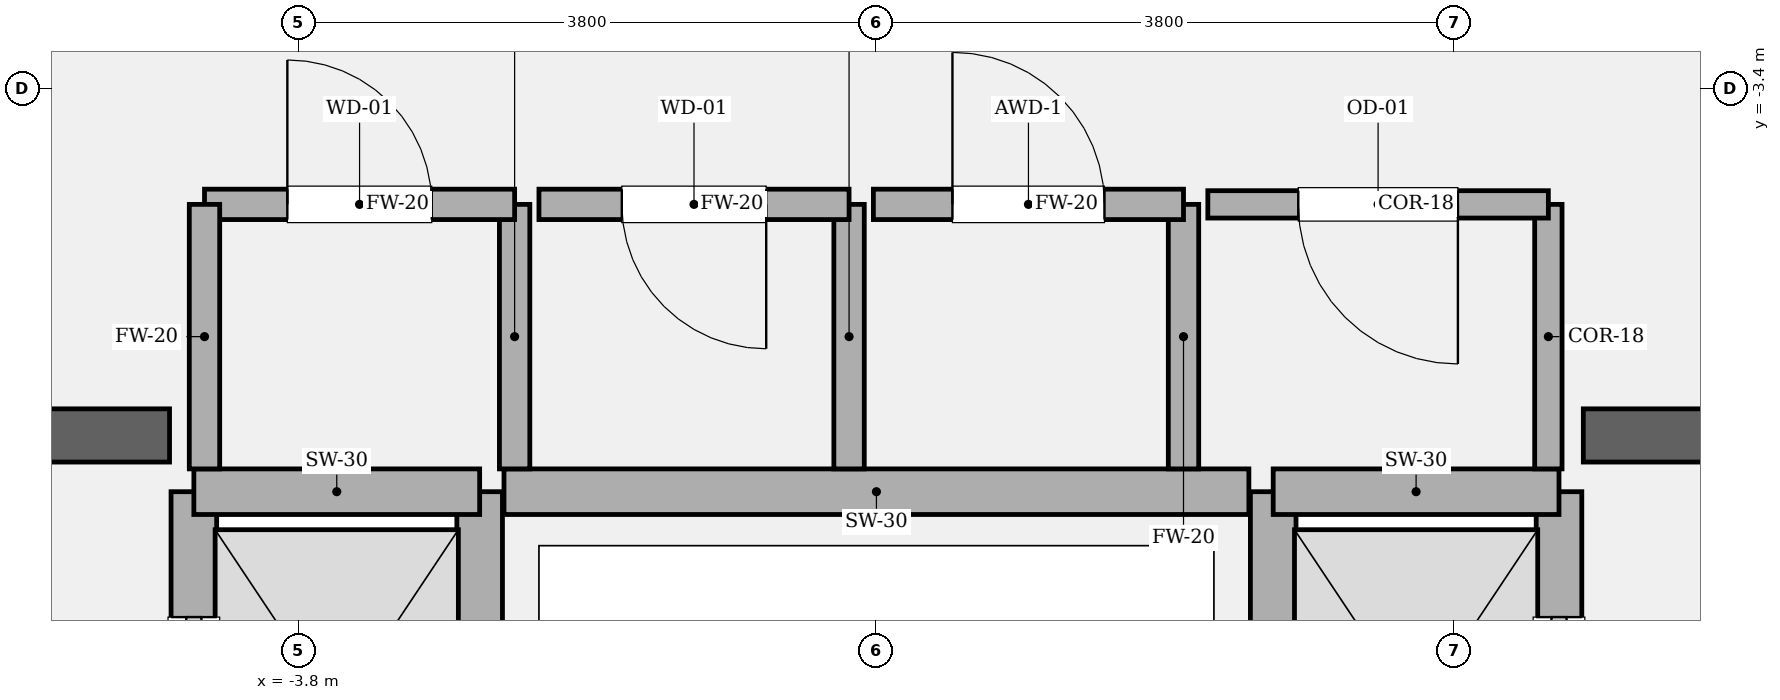
"""IFC4 building model, lengths in metres.
Left out: names, types, materials, properties, quantities, classifications, styles, units other than length and angle.
Written with IfcOpenShell. Run it as: python <this file> out.ifc"""

import sys

from ifc_helpers import new_model, si_unit, direction, frame, frame_2d, origin, place, context, subcontext, project, spatial, rectangle, extrude, element, fill, save


model = new_model("IFC4")
c1 = context("Model", 3, precision=1e-05, world=origin(), true_north=direction((0.0, 1.0)))
c2 = subcontext(c1, "Body", "Model", "MODEL_VIEW")
j1 = project(units=[si_unit("LENGTHUNIT", "METRE"), si_unit("PLANEANGLEUNIT", "RADIAN")], contexts=[c1])
p1 = place(None, origin())
s1 = spatial("IfcSite", under=j1, at=p1, CompositionType="ELEMENT")
p2 = place(p1, origin())
s2 = spatial("IfcBuilding", under=s1, at=p2, CompositionType="ELEMENT")
p3 = place(p2, frame((0.0, 0.0, 44.4)))
s3 = spatial("IfcBuildingStorey", under=s2, at=p3, CompositionType="ELEMENT", Elevation=44.4)
p4 = place(p3, frame((-9.825, -5.68, 0.0), z_axis=(0.0, 0.0, 1.0), x_axis=(1.0, 0.0, 0.0)))
e1 = element("IfcWall", 1, at=p4, inside=s3, PredefinedType="SOLIDWALL", context=c2, shape_type="SweptSolid", body=[
    extrude(rectangle(XDim=5.175, YDim=0.35, at=frame_2d((2.587, 0.0))), origin(), (0.0, 0.0, 1.0), 4.05),
])
p5 = place(p4, frame((1.285, 0.0, 0.0)))
e2 = element("IfcOpeningElement", 2, at=p5, cuts=e1, PredefinedType="OPENING", context=c2, shape_type="SweptSolid", body=[
    extrude(rectangle(XDim=1.18, YDim=2.2, at=frame_2d((0.59, 1.1))), frame((0.0, 0.185, 0.0), z_axis=(0.0, -1.0, 0.0), x_axis=(1.0, 0.0, 0.0)), (0.0, 0.0, 1.0), 0.37),
])
p6 = place(p3, frame((4.65, -5.68, 0.0), z_axis=(0.0, 0.0, 1.0), x_axis=(1.0, 0.0, 0.0)))
e3 = element("IfcWall", 3, at=p6, inside=s3, PredefinedType="SOLIDWALL", context=c2, shape_type="SweptSolid", body=[
    extrude(rectangle(XDim=5.175, YDim=0.35, at=frame_2d((2.587, 0.0))), origin(), (0.0, 0.0, 1.0), 4.05),
])
p7 = place(p6, frame((2.71, 0.0, 0.0)))
e4 = element("IfcOpeningElement", 4, at=p7, cuts=e3, PredefinedType="OPENING", context=c2, shape_type="SweptSolid", body=[
    extrude(rectangle(XDim=1.18, YDim=2.2, at=frame_2d((0.59, 1.1))), frame((0.0, 0.185, 0.0), z_axis=(0.0, -1.0, 0.0), x_axis=(1.0, 0.0, 0.0)), (0.0, 0.0, 1.0), 0.37),
])
p8 = place(p3, frame((-4.49, -8.82, 0.0), z_axis=(0.0, 0.0, 1.0), x_axis=(0.0, 1.0, 0.0)))
e5 = element("IfcWall", 5, at=p8, inside=s3, PredefinedType="SOLIDWALL", context=c2, shape_type="SweptSolid", body=[
    extrude(rectangle(XDim=2.77, YDim=0.3, at=frame_2d((1.385, 0.0))), origin(), (0.0, 0.0, 1.0), 3.81),
])
p9 = place(p8, frame((0.825, 0.0, 0.0)))
e6 = element("IfcOpeningElement", 6, at=p9, cuts=e5, PredefinedType="OPENING", context=c2, shape_type="SweptSolid", body=[
    extrude(rectangle(XDim=1.12, YDim=2.25, at=frame_2d((0.56, 1.125))), frame((0.0, 0.16, 0.0), z_axis=(0.0, -1.0, 0.0), x_axis=(1.0, 0.0, 0.0)), (0.0, 0.0, 1.0), 0.32),
])
p10 = place(p3, frame((-2.61, -8.82, 0.0), z_axis=(0.0, 0.0, 1.0), x_axis=(0.0, 1.0, 0.0)))
e7 = element("IfcWall", 7, at=p10, inside=s3, PredefinedType="SOLIDWALL", context=c2, shape_type="SweptSolid", body=[
    extrude(rectangle(XDim=2.77, YDim=0.3, at=frame_2d((1.385, 0.0))), origin(), (0.0, 0.0, 1.0), 3.81),
])
p11 = place(p3, frame((-4.49, -6.05, 0.0), z_axis=(0.0, 0.0, 1.0), x_axis=(1.0, 0.0, 0.0)))
e8 = element("IfcWall", 8, at=p11, inside=s3, PredefinedType="SOLIDWALL", context=c2, shape_type="SweptSolid", body=[
    extrude(rectangle(XDim=1.88, YDim=0.3, at=frame_2d((0.94, 0.0))), origin(), (0.0, 0.0, 1.0), 3.81),
])
p12 = place(p3, frame((4.49, -8.82, 0.0), z_axis=(0.0, 0.0, 1.0), x_axis=(0.0, 1.0, 0.0)))
e9 = element("IfcWall", 9, at=p12, inside=s3, PredefinedType="SOLIDWALL", context=c2, shape_type="SweptSolid", body=[
    extrude(rectangle(XDim=2.77, YDim=0.3, at=frame_2d((1.385, 0.0))), origin(), (0.0, 0.0, 1.0), 3.81),
])
p13 = place(p12, frame((0.825, 0.0, 0.0)))
e10 = element("IfcOpeningElement", 10, at=p13, cuts=e9, PredefinedType="OPENING", context=c2, shape_type="SweptSolid", body=[
    extrude(rectangle(XDim=1.12, YDim=2.25, at=frame_2d((0.56, 1.125))), frame((0.0, 0.16, 0.0), z_axis=(0.0, -1.0, 0.0), x_axis=(1.0, 0.0, 0.0)), (0.0, 0.0, 1.0), 0.32),
])
p14 = place(p3, frame((2.61, -8.82, 0.0), z_axis=(0.0, 0.0, 1.0), x_axis=(0.0, 1.0, 0.0)))
e11 = element("IfcWall", 11, at=p14, inside=s3, PredefinedType="SOLIDWALL", context=c2, shape_type="SweptSolid", body=[
    extrude(rectangle(XDim=2.77, YDim=0.3, at=frame_2d((1.385, 0.0))), origin(), (0.0, 0.0, 1.0), 3.81),
])
p15 = place(p3, frame((2.61, -6.05, 0.0), z_axis=(0.0, 0.0, 1.0), x_axis=(1.0, 0.0, 0.0)))
e12 = element("IfcWall", 12, at=p15, inside=s3, PredefinedType="SOLIDWALL", context=c2, shape_type="SweptSolid", body=[
    extrude(rectangle(XDim=1.88, YDim=0.3, at=frame_2d((0.94, 0.0))), origin(), (0.0, 0.0, 1.0), 3.81),
])
p16 = place(p3, frame((-2.45, -6.05, 0.0), z_axis=(0.0, 0.0, 1.0), x_axis=(1.0, 0.0, 0.0)))
e13 = element("IfcWall", 13, at=p16, inside=s3, PredefinedType="SOLIDWALL", context=c2, shape_type="SweptSolid", body=[
    extrude(rectangle(XDim=4.9, YDim=0.3, at=frame_2d((2.45, 0.0))), origin(), (0.0, 0.0, 1.0), 3.81),
])
p17 = place(p3, frame((-2.38, -5.9, 0.0), z_axis=(0.0, 0.0, 1.0), x_axis=(0.0, 1.0, 0.0)))
e14 = element("IfcWall", 14, at=p17, inside=s3, PredefinedType="SOLIDWALL", context=c2, shape_type="SweptSolid", body=[
    extrude(rectangle(XDim=1.74, YDim=0.2, at=frame_2d((0.87, 0.0))), origin(), (0.0, 0.0, 1.0), 3.81),
])
p18 = place(p3, frame((-2.38, -4.16, 0.0), z_axis=(0.0, 0.0, 1.0), x_axis=(-1.0, 0.0, 0.0)))
e15 = element("IfcWall", 15, at=p18, inside=s3, PredefinedType="SOLIDWALL", context=c2, shape_type="SweptSolid", body=[
    extrude(rectangle(XDim=2.04, YDim=0.2, at=frame_2d((1.02, 0.0))), origin(), (0.0, 0.0, 1.0), 3.81),
])
p19 = place(p18, frame((0.545, 0.0, 0.0)))
e16 = element("IfcOpeningElement", 16, at=p19, cuts=e15, PredefinedType="OPENING", context=c2, shape_type="SweptSolid", body=[
    extrude(rectangle(XDim=0.95, YDim=2.15, at=frame_2d((0.475, 1.075))), frame((0.0, 0.11, 0.0), z_axis=(0.0, -1.0, 0.0), x_axis=(1.0, 0.0, 0.0)), (0.0, 0.0, 1.0), 0.22),
])
for number, where, z_axis, x_axis in (
    (17, (-4.42, -4.16, 0.0), (0.0, 0.0, 1.0), (0.0, -1.0, 0.0)),
    (18, (-0.18, -5.9, 0.0), (0.0, 0.0, 1.0), (0.0, 1.0, 0.0)),
):
    element("IfcWall", number, at=place(p3, frame(where, z_axis=z_axis, x_axis=x_axis)), inside=s3, PredefinedType="SOLIDWALL", context=c2, shape_type="SweptSolid", body=[
        extrude(rectangle(XDim=1.74, YDim=0.2, at=frame_2d((0.87, 0.0))), origin(), (0.0, 0.0, 1.0), 3.81),
    ])
p20 = place(p3, frame((-0.18, -4.16, 0.0), z_axis=(0.0, 0.0, 1.0), x_axis=(-1.0, 0.0, 0.0)))
e19 = element("IfcWall", 19, at=p20, inside=s3, PredefinedType="SOLIDWALL", context=c2, shape_type="SweptSolid", body=[
    extrude(rectangle(XDim=2.04, YDim=0.2, at=frame_2d((1.02, 0.0))), origin(), (0.0, 0.0, 1.0), 3.81),
])
p21 = place(p20, frame((0.545, 0.0, 0.0)))
e20 = element("IfcOpeningElement", 20, at=p21, cuts=e19, PredefinedType="OPENING", context=c2, shape_type="SweptSolid", body=[
    extrude(rectangle(XDim=0.95, YDim=2.15, at=frame_2d((0.475, 1.075))), frame((0.0, 0.11, 0.0), z_axis=(0.0, -1.0, 0.0), x_axis=(1.0, 0.0, 0.0)), (0.0, 0.0, 1.0), 0.22),
])
p22 = place(p3, frame((2.02, -5.9, 0.0), z_axis=(0.0, 0.0, 1.0), x_axis=(0.0, 1.0, 0.0)))
e21 = element("IfcWall", 21, at=p22, inside=s3, PredefinedType="SOLIDWALL", context=c2, shape_type="SweptSolid", body=[
    extrude(rectangle(XDim=1.74, YDim=0.2, at=frame_2d((0.87, 0.0))), origin(), (0.0, 0.0, 1.0), 3.81),
])
p23 = place(p3, frame((2.02, -4.16, 0.0), z_axis=(0.0, 0.0, 1.0), x_axis=(-1.0, 0.0, 0.0)))
e22 = element("IfcWall", 22, at=p23, inside=s3, PredefinedType="SOLIDWALL", context=c2, shape_type="SweptSolid", body=[
    extrude(rectangle(XDim=2.04, YDim=0.2, at=frame_2d((1.02, 0.0))), origin(), (0.0, 0.0, 1.0), 3.81),
])
p24 = place(p23, frame((0.52, 0.0, 0.0)))
e23 = element("IfcOpeningElement", 23, at=p24, cuts=e22, PredefinedType="OPENING", context=c2, shape_type="SweptSolid", body=[
    extrude(rectangle(XDim=1.0, YDim=2.15, at=frame_2d((0.5, 1.075))), frame((0.0, 0.11, 0.0), z_axis=(0.0, -1.0, 0.0), x_axis=(1.0, 0.0, 0.0)), (0.0, 0.0, 1.0), 0.22),
])
p25 = place(p3, frame((4.42, -5.9, 0.0), z_axis=(0.0, 0.0, 1.0), x_axis=(0.0, 1.0, 0.0)))
e24 = element("IfcWall", 24, at=p25, inside=s3, PredefinedType="PARTITIONING", context=c2, shape_type="SweptSolid", body=[
    extrude(rectangle(XDim=1.74, YDim=0.18, at=frame_2d((0.87, 0.0))), origin(), (0.0, 0.0, 1.0), 3.81),
])
p26 = place(p3, frame((4.42, -4.16, 0.0), z_axis=(0.0, 0.0, 1.0), x_axis=(-1.0, 0.0, 0.0)))
e25 = element("IfcWall", 25, at=p26, inside=s3, PredefinedType="PARTITIONING", context=c2, shape_type="SweptSolid", body=[
    extrude(rectangle(XDim=2.24, YDim=0.18, at=frame_2d((1.12, 0.0))), origin(), (0.0, 0.0, 1.0), 3.81),
])
p27 = place(p26, frame((0.595, 0.0, 0.0)))
e26 = element("IfcOpeningElement", 26, at=p27, cuts=e25, PredefinedType="OPENING", context=c2, shape_type="SweptSolid", body=[
    extrude(rectangle(XDim=1.05, YDim=2.2, at=frame_2d((0.525, 1.1))), frame((0.0, 0.1, 0.0), z_axis=(0.0, -1.0, 0.0), x_axis=(1.0, 0.0, 0.0)), (0.0, 0.0, 1.0), 0.2),
])
p28 = place(p9, origin())
e27 = element("IfcDoor", 27, at=p28, inside=s3, OperationType="SLIDING_TO_LEFT", PredefinedType="DOOR", context=c2, shape_type="SweptSolid", body=[
    extrude(rectangle(XDim=1.12, YDim=2.25, at=frame_2d((0.56, 1.125))), frame((0.0, 0.025, 0.0), z_axis=(0.0, -1.0, 0.0), x_axis=(1.0, 0.0, 0.0)), (0.0, 0.0, 1.0), 0.05),
])
fill(e6, e27)
p29 = place(p13, origin())
e28 = element("IfcDoor", 28, at=p29, inside=s3, OperationType="SLIDING_TO_RIGHT", PredefinedType="DOOR", context=c2, shape_type="SweptSolid", body=[
    extrude(rectangle(XDim=1.12, YDim=2.25, at=frame_2d((0.56, 1.125))), frame((0.0, 0.025, 0.0), z_axis=(0.0, -1.0, 0.0), x_axis=(1.0, 0.0, 0.0)), (0.0, 0.0, 1.0), 0.05),
])
fill(e10, e28)
p30 = place(p19, origin())
e29 = element("IfcDoor", 29, at=p30, inside=s3, OperationType="SINGLE_SWING_RIGHT", PredefinedType="DOOR", context=c2, shape_type="SweptSolid", body=[
    extrude(rectangle(XDim=0.95, YDim=2.15, at=frame_2d((0.475, 1.075))), frame((0.0, 0.025, 0.0), z_axis=(0.0, -1.0, 0.0), x_axis=(1.0, 0.0, 0.0)), (0.0, 0.0, 1.0), 0.05),
])
fill(e16, e29)
p31 = place(p21, origin())
e30 = element("IfcDoor", 30, at=p31, inside=s3, OperationType="SINGLE_SWING_LEFT", PredefinedType="DOOR", context=c2, shape_type="SweptSolid", body=[
    extrude(rectangle(XDim=0.95, YDim=2.15, at=frame_2d((0.475, 1.075))), frame((0.0, 0.025, 0.0), z_axis=(0.0, -1.0, 0.0), x_axis=(1.0, 0.0, 0.0)), (0.0, 0.0, 1.0), 0.05),
])
fill(e20, e30)
p32 = place(p24, origin())
e31 = element("IfcDoor", 31, at=p32, inside=s3, OperationType="SINGLE_SWING_RIGHT", PredefinedType="DOOR", context=c2, shape_type="SweptSolid", body=[
    extrude(rectangle(XDim=1.0, YDim=2.15, at=frame_2d((0.5, 1.075))), frame((0.0, 0.025, 0.0), z_axis=(0.0, -1.0, 0.0), x_axis=(1.0, 0.0, 0.0)), (0.0, 0.0, 1.0), 0.05),
])
fill(e23, e31)
p33 = place(p27, origin())
e32 = element("IfcDoor", 32, at=p33, inside=s3, OperationType="SINGLE_SWING_LEFT", PredefinedType="DOOR", context=c2, shape_type="SweptSolid", body=[
    extrude(rectangle(XDim=1.05, YDim=2.2, at=frame_2d((0.525, 1.1))), frame((0.0, 0.025, 0.0), z_axis=(0.0, -1.0, 0.0), x_axis=(1.0, 0.0, 0.0)), (0.0, 0.0, 1.0), 0.05),
])
fill(e26, e32)
save(model, sys.argv[1])
